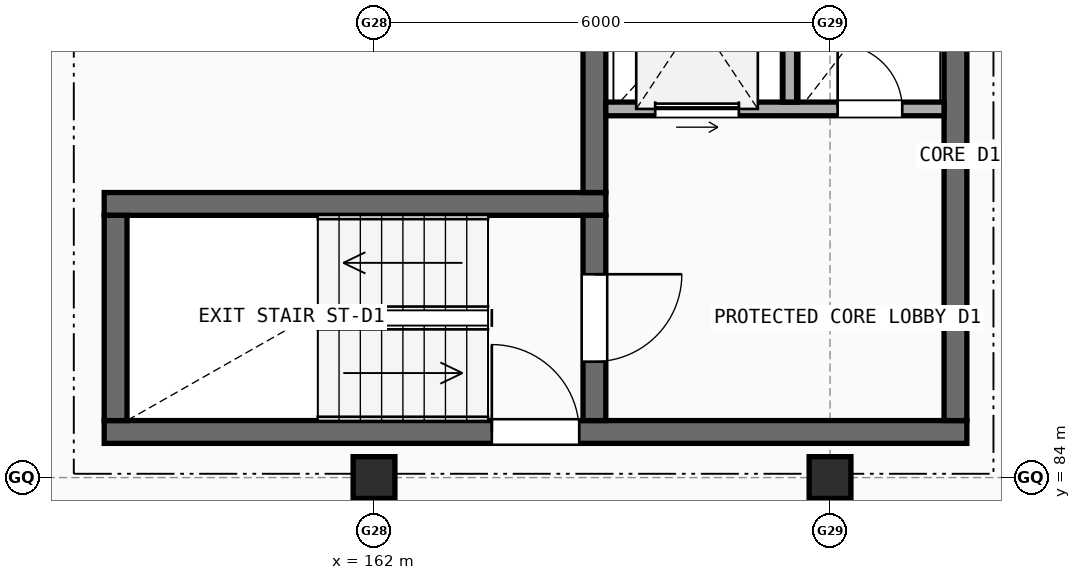
"""IFC4 building model, lengths in metres.
Left out: names, types, materials, properties, quantities, classifications, styles, units other than length and angle.
Written with IfcOpenShell. Run it as: python <this file> out.ifc"""

import sys

from ifc_helpers import new_model, si_unit, direction, frame, frame_2d, origin, origin_2d, place, context, subcontext, project, spatial, rectangle, extrude, element, fill, save


model = new_model("IFC4")
c1 = context("Model", 3, precision=1e-05, world=origin(), true_north=direction((0.0, 1.0)))
c2 = subcontext(c1, "Body", "Model", "MODEL_VIEW")
j1 = project(units=[si_unit("LENGTHUNIT", "METRE"), si_unit("PLANEANGLEUNIT", "RADIAN")], contexts=[c1])
p1 = place(None, origin())
s1 = spatial("IfcSite", under=j1, at=p1, CompositionType="ELEMENT")
p2 = place(p1, origin())
s2 = spatial("IfcBuilding", under=s1, at=p2, CompositionType="ELEMENT")
p3 = place(p2, frame((0.0, 0.0, 23.7)))
s3 = spatial("IfcBuildingStorey", under=s2, at=p3, CompositionType="ELEMENT", Elevation=23.7)
for number, where, z_axis, x_axis in (
    (1, (162.0, 84.0, 0.0), (0.0, 0.0, 1.0), (1.0, 0.0, 0.0)),
    (2, (168.0, 84.0, 0.0), (0.0, 0.0, 1.0), (1.0, 0.0, 0.0)),
):
    element("IfcColumn", number, at=place(p3, frame(where, z_axis=z_axis, x_axis=x_axis)), inside=s3, PredefinedType="COLUMN", context=c2, shape_type="SweptSolid", body=[
        extrude(rectangle(XDim=0.55, YDim=0.55, at=origin_2d()), origin(), (0.0, 0.0, 1.0), 2.975),
    ])
p4 = place(p3, frame((158.45, 84.6, 0.0), z_axis=(0.0, 0.0, 1.0), x_axis=(1.0, 0.0, 0.0)))
e3 = element("IfcWall", 3, at=p4, inside=s3, PredefinedType="SHEAR", context=c2, shape_type="SweptSolid", body=[
    extrude(rectangle(XDim=11.35, YDim=0.3, at=frame_2d((5.675, 0.0))), origin(), (0.0, 0.0, 1.0), 2.975),
])
p5 = place(p4, frame((5.1, 0.0, 0.0)))
e4 = element("IfcOpeningElement", 4, at=p5, cuts=e3, PredefinedType="OPENING", context=c2, shape_type="SweptSolid", body=[
    extrude(rectangle(XDim=1.15, YDim=2.15, at=frame_2d((0.575, 1.075))), frame((0.0, 0.16, 0.0), z_axis=(0.0, -1.0, 0.0), x_axis=(1.0, 0.0, 0.0)), (0.0, 0.0, 1.0), 0.32),
])
p6 = place(p3, frame((165.05, 87.6, 0.0), z_axis=(0.0, 0.0, 1.0), x_axis=(-1.0, 0.0, 0.0)))
e5 = element("IfcWall", 5, at=p6, inside=s3, PredefinedType="SHEAR", context=c2, shape_type="SweptSolid", body=[
    extrude(rectangle(XDim=6.6, YDim=0.3, at=frame_2d((3.3, 0.0))), origin(), (0.0, 0.0, 1.0), 2.975),
])
p7 = place(p3, frame((158.6, 87.45, 0.0), z_axis=(0.0, 0.0, 1.0), x_axis=(0.0, -1.0, 0.0)))
e6 = element("IfcWall", 6, at=p7, inside=s3, PredefinedType="SHEAR", context=c2, shape_type="SweptSolid", body=[
    extrude(rectangle(XDim=2.7, YDim=0.3, at=frame_2d((1.35, 0.0))), origin(), (0.0, 0.0, 1.0), 2.975),
])
p8 = place(p3, frame((164.9, 84.75, 0.0), z_axis=(0.0, 0.0, 1.0), x_axis=(0.0, 1.0, 0.0)))
e7 = element("IfcWall", 7, at=p8, inside=s3, PredefinedType="SHEAR", context=c2, shape_type="SweptSolid", body=[
    extrude(rectangle(XDim=2.7, YDim=0.3, at=frame_2d((1.35, 0.0))), origin(), (0.0, 0.0, 1.0), 2.975),
])
p9 = place(p8, frame((0.775, 0.0, 0.0)))
e8 = element("IfcOpeningElement", 8, at=p9, cuts=e7, PredefinedType="OPENING", context=c2, shape_type="SweptSolid", body=[
    extrude(rectangle(XDim=1.15, YDim=2.15, at=frame_2d((0.575, 1.075))), frame((0.0, 0.16, 0.0), z_axis=(0.0, -1.0, 0.0), x_axis=(1.0, 0.0, 0.0)), (0.0, 0.0, 1.0), 0.32),
])
p10 = place(p3, frame((169.65, 84.75, 0.0), z_axis=(0.0, 0.0, 1.0), x_axis=(0.0, 1.0, 0.0)))
e9 = element("IfcWall", 9, at=p10, inside=s3, PredefinedType="SHEAR", context=c2, shape_type="SweptSolid", body=[
    extrude(rectangle(XDim=6.45, YDim=0.3, at=frame_2d((3.225, 0.0))), origin(), (0.0, 0.0, 1.0), 2.975),
])
p11 = place(p3, frame((164.9, 87.75, 0.0), z_axis=(0.0, 0.0, 1.0), x_axis=(0.0, 1.0, 0.0)))
e10 = element("IfcWall", 10, at=p11, inside=s3, PredefinedType="SHEAR", context=c2, shape_type="SweptSolid", body=[
    extrude(rectangle(XDim=3.45, YDim=0.3, at=frame_2d((1.725, 0.0))), origin(), (0.0, 0.0, 1.0), 2.975),
])
p12 = place(p3, frame((165.05, 88.85, 0.0), z_axis=(0.0, 0.0, 1.0), x_axis=(1.0, 0.0, 0.0)))
e11 = element("IfcWall", 11, at=p12, inside=s3, PredefinedType="SOLIDWALL", context=c2, shape_type="SweptSolid", body=[
    extrude(rectangle(XDim=4.45, YDim=0.18, at=frame_2d((2.225, 0.0))), origin(), (0.0, 0.0, 1.0), 2.975),
])
p13 = place(p12, frame((0.65, 0.0, 0.0)))
e12 = element("IfcOpeningElement", 12, at=p13, cuts=e11, PredefinedType="OPENING", context=c2, shape_type="SweptSolid", body=[
    extrude(rectangle(XDim=1.1, YDim=2.15, at=frame_2d((0.55, 1.075))), frame((0.0, 0.1, 0.0), z_axis=(0.0, -1.0, 0.0), x_axis=(1.0, 0.0, 0.0)), (0.0, 0.0, 1.0), 0.2),
])
p14 = place(p12, frame((3.05, 0.0, 0.0)))
e13 = element("IfcOpeningElement", 13, at=p14, cuts=e11, PredefinedType="OPENING", context=c2, shape_type="SweptSolid", body=[
    extrude(rectangle(XDim=0.85, YDim=2.1, at=frame_2d((0.425, 1.05))), frame((0.0, 0.1, 0.0), z_axis=(0.0, -1.0, 0.0), x_axis=(1.0, 0.0, 0.0)), (0.0, 0.0, 1.0), 0.2),
])
p15 = place(p3, frame((167.47, 88.94, 0.0), z_axis=(0.0, 0.0, 1.0), x_axis=(0.0, 1.0, 0.0)))
e14 = element("IfcWall", 14, at=p15, inside=s3, PredefinedType="SOLIDWALL", context=c2, shape_type="SweptSolid", body=[
    extrude(rectangle(XDim=2.26, YDim=0.18, at=frame_2d((1.13, 0.0))), origin(), (0.0, 0.0, 1.0), 2.975),
])
p16 = place(p5, origin())
e15 = element("IfcDoor", 15, at=p16, inside=s3, OperationType="SINGLE_SWING_LEFT", PredefinedType="DOOR", context=c2, shape_type="SweptSolid", body=[
    extrude(rectangle(XDim=1.15, YDim=2.15, at=frame_2d((0.575, 1.075))), frame((0.0, 0.025, 0.0), z_axis=(0.0, -1.0, 0.0), x_axis=(1.0, 0.0, 0.0)), (0.0, 0.0, 1.0), 0.05),
])
fill(e4, e15)
p17 = place(p9, origin())
e16 = element("IfcDoor", 16, at=p17, inside=s3, OperationType="SINGLE_SWING_RIGHT", PredefinedType="DOOR", context=c2, shape_type="SweptSolid", body=[
    extrude(rectangle(XDim=1.15, YDim=2.15, at=frame_2d((0.575, 1.075))), frame((0.0, 0.025, 0.0), z_axis=(0.0, -1.0, 0.0), x_axis=(1.0, 0.0, 0.0)), (0.0, 0.0, 1.0), 0.05),
])
fill(e8, e16)
p18 = place(p13, origin())
e17 = element("IfcDoor", 17, at=p18, inside=s3, OperationType="SLIDING_TO_LEFT", PredefinedType="DOOR", context=c2, shape_type="SweptSolid", body=[
    extrude(rectangle(XDim=1.1, YDim=2.15, at=frame_2d((0.55, 1.075))), frame((0.0, 0.025, 0.0), z_axis=(0.0, -1.0, 0.0), x_axis=(1.0, 0.0, 0.0)), (0.0, 0.0, 1.0), 0.05),
])
fill(e12, e17)
p19 = place(p14, frame((0.85, 0.0, 0.0), z_axis=(0.0, 0.0, 1.0), x_axis=(-1.0, 0.0, 0.0)))
e18 = element("IfcDoor", 18, at=p19, inside=s3, OperationType="SINGLE_SWING_LEFT", PredefinedType="DOOR", context=c2, shape_type="SweptSolid", body=[
    extrude(rectangle(XDim=0.85, YDim=2.1, at=frame_2d((0.425, 1.05))), frame((0.0, 0.025, 0.0), z_axis=(0.0, -1.0, 0.0), x_axis=(1.0, 0.0, 0.0)), (0.0, 0.0, 1.0), 0.05),
])
fill(e13, e18)
save(model, sys.argv[1])
